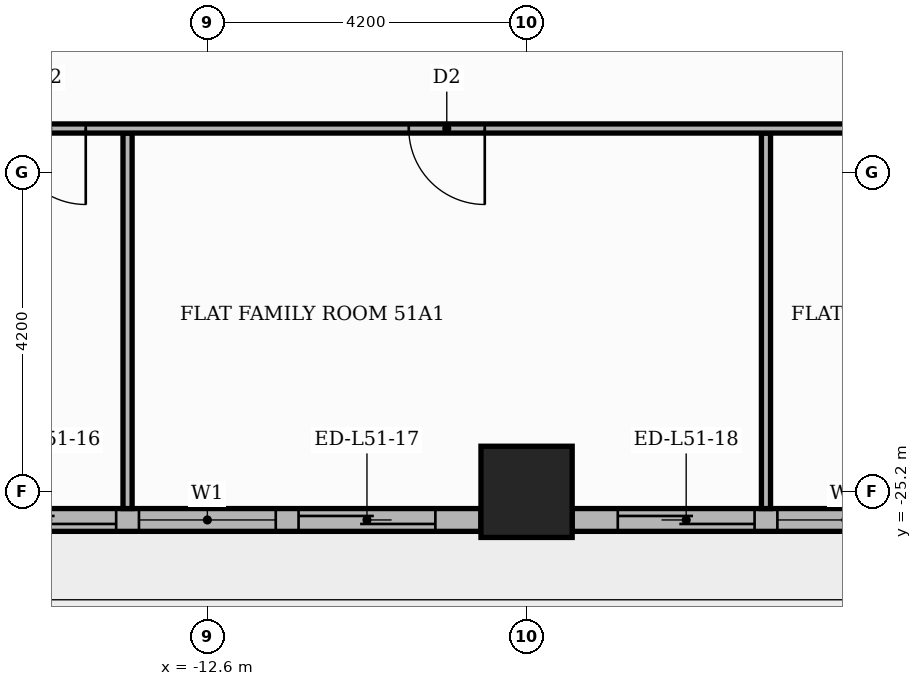
"""IFC4 building model, lengths in metres.
Left out: names, types, materials, properties, quantities, classifications, styles, units other than length and angle.
Written with IfcOpenShell. Run it as: python <this file> out.ifc"""

import sys

from ifc_helpers import new_model, si_unit, direction, frame, frame_2d, origin, origin_2d, place, context, subcontext, project, spatial, rectangle, extrude, element, fill, save


model = new_model("IFC4")
c1 = context("Model", 3, precision=1e-05, world=origin(), true_north=direction((0.0, 1.0)))
c2 = subcontext(c1, "Body", "Model", "MODEL_VIEW")
j1 = project(units=[si_unit("LENGTHUNIT", "METRE"), si_unit("PLANEANGLEUNIT", "RADIAN")], contexts=[c1])
p1 = place(None, origin())
s1 = spatial("IfcSite", under=j1, at=p1, CompositionType="ELEMENT")
p2 = place(p1, origin())
s2 = spatial("IfcBuilding", under=s1, at=p2, CompositionType="ELEMENT")
p3 = place(p2, frame((0.0, 0.0, 215.7)))
s3 = spatial("IfcBuildingStorey", under=s2, at=p3, CompositionType="ELEMENT", Elevation=215.7)
p4 = place(p3, frame((-8.4, -25.2, 0.0), z_axis=(0.0, 0.0, 1.0), x_axis=(1.0, 0.0, 0.0)))
e1 = element("IfcColumn", 1, at=p4, inside=s3, PredefinedType="COLUMN", context=c2, shape_type="SweptSolid", body=[
    extrude(rectangle(XDim=1.2, YDim=1.2, at=origin_2d()), origin(), (0.0, 0.0, 1.0), 3.9),
])
p5 = place(p3, frame((-16.2, -25.57, 0.0), z_axis=(0.0, 0.0, 1.0), x_axis=(1.0, 0.0, 0.0)))
e2 = element("IfcWall", 2, at=p5, inside=s3, PredefinedType="STANDARD", context=c2, shape_type="SweptSolid", body=[
    extrude(rectangle(XDim=7.2, YDim=0.3, at=frame_2d((3.6, 0.0))), origin(), (0.0, 0.0, 1.0), 3.48),
])
p6 = place(p5, frame((0.6, 0.0, 0.0)))
e3 = element("IfcOpeningElement", 3, at=p6, cuts=e2, PredefinedType="OPENING", context=c2, shape_type="SweptSolid", body=[
    extrude(rectangle(XDim=1.8, YDim=2.4, at=frame_2d((0.9, 1.2))), frame((0.0, 0.16, 0.0), z_axis=(0.0, -1.0, 0.0), x_axis=(1.0, 0.0, 0.0)), (0.0, 0.0, 1.0), 0.32),
])
p7 = place(p5, frame((2.7, 0.0, 0.9)))
e4 = element("IfcOpeningElement", 4, at=p7, cuts=e2, PredefinedType="OPENING", context=c2, shape_type="SweptSolid", body=[
    extrude(rectangle(XDim=1.8, YDim=2.1, at=frame_2d((0.9, 1.05))), frame((0.0, 0.16, 0.0), z_axis=(0.0, -1.0, 0.0), x_axis=(1.0, 0.0, 0.0)), (0.0, 0.0, 1.0), 0.32),
])
p8 = place(p5, frame((4.8, 0.0, 0.0)))
e5 = element("IfcOpeningElement", 5, at=p8, cuts=e2, PredefinedType="OPENING", context=c2, shape_type="SweptSolid", body=[
    extrude(rectangle(XDim=1.8, YDim=2.4, at=frame_2d((0.9, 1.2))), frame((0.0, 0.16, 0.0), z_axis=(0.0, -1.0, 0.0), x_axis=(1.0, 0.0, 0.0)), (0.0, 0.0, 1.0), 0.32),
])
p9 = place(p3, frame((-7.8, -25.57, 0.0), z_axis=(0.0, 0.0, 1.0), x_axis=(1.0, 0.0, 0.0)))
e6 = element("IfcWall", 6, at=p9, inside=s3, PredefinedType="STANDARD", context=c2, shape_type="SweptSolid", body=[
    extrude(rectangle(XDim=7.2, YDim=0.3, at=frame_2d((3.6, 0.0))), origin(), (0.0, 0.0, 1.0), 3.48),
])
p10 = place(p9, frame((0.6, 0.0, 0.0)))
e7 = element("IfcOpeningElement", 7, at=p10, cuts=e6, PredefinedType="OPENING", context=c2, shape_type="SweptSolid", body=[
    extrude(rectangle(XDim=1.8, YDim=2.4, at=frame_2d((0.9, 1.2))), frame((0.0, 0.16, 0.0), z_axis=(0.0, -1.0, 0.0), x_axis=(1.0, 0.0, 0.0)), (0.0, 0.0, 1.0), 0.32),
])
p11 = place(p9, frame((2.7, 0.0, 0.9)))
e8 = element("IfcOpeningElement", 8, at=p11, cuts=e6, PredefinedType="OPENING", context=c2, shape_type="SweptSolid", body=[
    extrude(rectangle(XDim=1.8, YDim=2.1, at=frame_2d((0.9, 1.05))), frame((0.0, 0.16, 0.0), z_axis=(0.0, -1.0, 0.0), x_axis=(1.0, 0.0, 0.0)), (0.0, 0.0, 1.0), 0.32),
])
p12 = place(p9, frame((4.8, 0.0, 0.0)))
e9 = element("IfcOpeningElement", 9, at=p12, cuts=e6, PredefinedType="OPENING", context=c2, shape_type="SweptSolid", body=[
    extrude(rectangle(XDim=1.8, YDim=2.4, at=frame_2d((0.9, 1.2))), frame((0.0, 0.16, 0.0), z_axis=(0.0, -1.0, 0.0), x_axis=(1.0, 0.0, 0.0)), (0.0, 0.0, 1.0), 0.32),
])
for number, where, z_axis, x_axis in (
    (10, (-13.65, -25.42, 0.0), (0.0, 0.0, 1.0), (0.0, 1.0, 0.0)),
    (11, (-5.25, -25.42, 0.0), (0.0, 0.0, 1.0), (0.0, 1.0, 0.0)),
):
    element("IfcWall", number, at=place(p3, frame(where, z_axis=z_axis, x_axis=x_axis)), inside=s3, PredefinedType="PARTITIONING", context=c2, shape_type="SweptSolid", body=[
        extrude(rectangle(XDim=4.94, YDim=0.12, at=frame_2d((2.47, 0.0))), origin(), (0.0, 0.0, 1.0), 3.48),
    ])
p13 = place(p3, frame((-21.219, -20.42, 0.0), z_axis=(0.0, 0.0, 1.0), x_axis=(1.0, 0.0, 0.0)))
e12 = element("IfcWall", 12, at=p13, inside=s3, PredefinedType="PARTITIONING", context=c2, shape_type="SweptSolid", body=[
    extrude(rectangle(XDim=34.769, YDim=0.12, at=frame_2d((17.385, 0.0))), origin(), (0.0, 0.0, 1.0), 3.48),
])
p14 = place(p13, frame((6.019, 0.0, 0.0)))
e13 = element("IfcOpeningElement", 13, at=p14, cuts=e12, PredefinedType="OPENING", context=c2, shape_type="SweptSolid", body=[
    extrude(rectangle(XDim=1.0, YDim=2.1, at=frame_2d((0.5, 1.05))), frame((0.0, 0.07, 0.0), z_axis=(0.0, -1.0, 0.0), x_axis=(1.0, 0.0, 0.0)), (0.0, 0.0, 1.0), 0.14),
])
p15 = place(p13, frame((11.269, 0.0, 0.0)))
e14 = element("IfcOpeningElement", 14, at=p15, cuts=e12, PredefinedType="OPENING", context=c2, shape_type="SweptSolid", body=[
    extrude(rectangle(XDim=1.0, YDim=2.1, at=frame_2d((0.5, 1.05))), frame((0.0, 0.07, 0.0), z_axis=(0.0, -1.0, 0.0), x_axis=(1.0, 0.0, 0.0)), (0.0, 0.0, 1.0), 0.14),
])
p16 = place(p13, frame((19.719, 0.0, 0.0)))
e15 = element("IfcOpeningElement", 15, at=p16, cuts=e12, PredefinedType="OPENING", context=c2, shape_type="SweptSolid", body=[
    extrude(rectangle(XDim=0.9, YDim=2.1, at=frame_2d((0.45, 1.05))), frame((0.0, 0.07, 0.0), z_axis=(0.0, -1.0, 0.0), x_axis=(1.0, 0.0, 0.0)), (0.0, 0.0, 1.0), 0.14),
])
p17 = place(p13, frame((30.219, 0.0, 0.0)))
e16 = element("IfcOpeningElement", 16, at=p17, cuts=e12, PredefinedType="OPENING", context=c2, shape_type="SweptSolid", body=[
    extrude(rectangle(XDim=0.9, YDim=2.1, at=frame_2d((0.45, 1.05))), frame((0.0, 0.07, 0.0), z_axis=(0.0, -1.0, 0.0), x_axis=(1.0, 0.0, 0.0)), (0.0, 0.0, 1.0), 0.14),
])
p18 = place(p6, origin())
e17 = element("IfcDoor", 17, at=p18, inside=s3, OperationType="SLIDING_TO_LEFT", PredefinedType="DOOR", context=c2, shape_type="SweptSolid", body=[
    extrude(rectangle(XDim=1.8, YDim=2.4, at=frame_2d((0.9, 1.2))), frame((0.0, 0.025, 0.0), z_axis=(0.0, -1.0, 0.0), x_axis=(1.0, 0.0, 0.0)), (0.0, 0.0, 1.0), 0.05),
])
fill(e3, e17)
p19 = place(p7, origin())
e18 = element("IfcWindow", 18, at=p19, inside=s3, PartitioningType="SINGLE_PANEL", PredefinedType="WINDOW", context=c2, shape_type="SweptSolid", body=[
    extrude(rectangle(XDim=1.8, YDim=2.1, at=frame_2d((0.9, 1.05))), frame((0.0, 0.03, 0.0), z_axis=(0.0, -1.0, 0.0), x_axis=(1.0, 0.0, 0.0)), (0.0, 0.0, 1.0), 0.06),
])
fill(e4, e18)
p20 = place(p8, origin())
e19 = element("IfcDoor", 19, at=p20, inside=s3, OperationType="SLIDING_TO_RIGHT", PredefinedType="DOOR", context=c2, shape_type="SweptSolid", body=[
    extrude(rectangle(XDim=1.8, YDim=2.4, at=frame_2d((0.9, 1.2))), frame((0.0, 0.025, 0.0), z_axis=(0.0, -1.0, 0.0), x_axis=(1.0, 0.0, 0.0)), (0.0, 0.0, 1.0), 0.05),
])
fill(e5, e19)
p21 = place(p10, origin())
e20 = element("IfcDoor", 20, at=p21, inside=s3, OperationType="SLIDING_TO_LEFT", PredefinedType="DOOR", context=c2, shape_type="SweptSolid", body=[
    extrude(rectangle(XDim=1.8, YDim=2.4, at=frame_2d((0.9, 1.2))), frame((0.0, 0.025, 0.0), z_axis=(0.0, -1.0, 0.0), x_axis=(1.0, 0.0, 0.0)), (0.0, 0.0, 1.0), 0.05),
])
fill(e7, e20)
p22 = place(p11, origin())
e21 = element("IfcWindow", 21, at=p22, inside=s3, PartitioningType="SINGLE_PANEL", PredefinedType="WINDOW", context=c2, shape_type="SweptSolid", body=[
    extrude(rectangle(XDim=1.8, YDim=2.1, at=frame_2d((0.9, 1.05))), frame((0.0, 0.03, 0.0), z_axis=(0.0, -1.0, 0.0), x_axis=(1.0, 0.0, 0.0)), (0.0, 0.0, 1.0), 0.06),
])
fill(e8, e21)
p23 = place(p14, frame((1.0, 0.0, 0.0), z_axis=(0.0, 0.0, 1.0), x_axis=(-1.0, 0.0, 0.0)))
e22 = element("IfcDoor", 22, at=p23, inside=s3, OperationType="SINGLE_SWING_RIGHT", PredefinedType="DOOR", context=c2, shape_type="SweptSolid", body=[
    extrude(rectangle(XDim=1.0, YDim=2.1, at=frame_2d((0.5, 1.05))), frame((0.0, 0.025, 0.0), z_axis=(0.0, -1.0, 0.0), x_axis=(1.0, 0.0, 0.0)), (0.0, 0.0, 1.0), 0.05),
])
fill(e13, e22)
p24 = place(p15, frame((1.0, 0.0, 0.0), z_axis=(0.0, 0.0, 1.0), x_axis=(-1.0, 0.0, 0.0)))
e23 = element("IfcDoor", 23, at=p24, inside=s3, OperationType="SINGLE_SWING_RIGHT", PredefinedType="DOOR", context=c2, shape_type="SweptSolid", body=[
    extrude(rectangle(XDim=1.0, YDim=2.1, at=frame_2d((0.5, 1.05))), frame((0.0, 0.025, 0.0), z_axis=(0.0, -1.0, 0.0), x_axis=(1.0, 0.0, 0.0)), (0.0, 0.0, 1.0), 0.05),
])
fill(e14, e23)
save(model, sys.argv[1])
